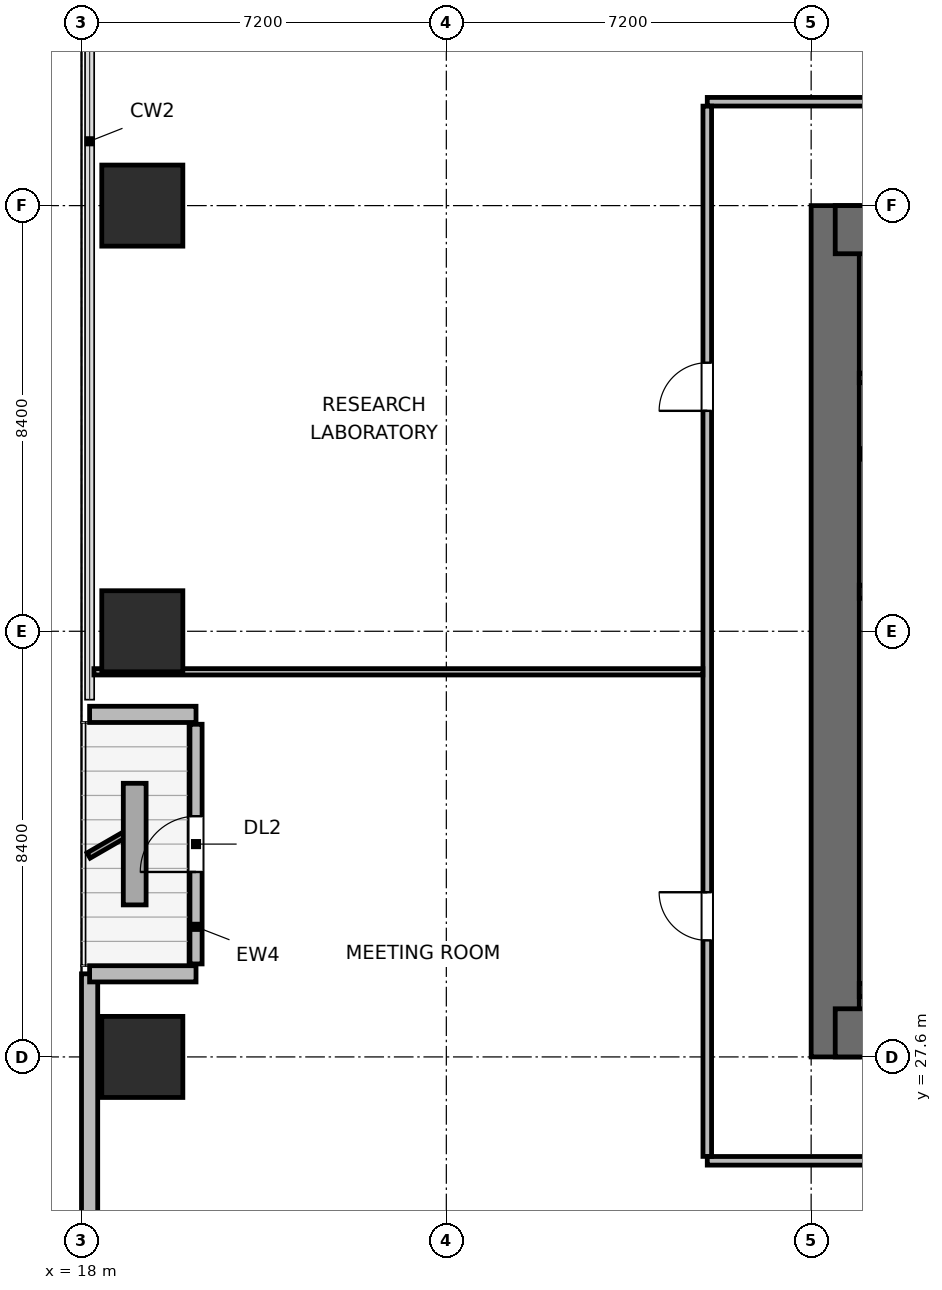
"""IFC4 building model, lengths in metres.
Left out: names, types, materials, properties, quantities, classifications, styles, units other than length and angle.
Written with IfcOpenShell. Run it as: python <this file> out.ifc"""

import sys

from ifc_helpers import new_model, si_unit, direction, frame, frame_2d, origin, origin_2d, place, context, subcontext, project, spatial, rectangle, extrude, element, fill, save


model = new_model("IFC4")
c1 = context("Model", 3, precision=1e-05, world=origin(), true_north=direction((0.0, 1.0)))
c2 = subcontext(c1, "Body", "Model", "MODEL_VIEW")
j1 = project(units=[si_unit("LENGTHUNIT", "METRE"), si_unit("PLANEANGLEUNIT", "RADIAN")], contexts=[c1])
p1 = place(None, origin())
s1 = spatial("IfcSite", under=j1, at=p1, CompositionType="ELEMENT")
p2 = place(p1, origin())
s2 = spatial("IfcBuilding", under=s1, at=p2, CompositionType="ELEMENT")
p3 = place(p2, frame((0.0, 0.0, 25.5)))
s3 = spatial("IfcBuildingStorey", under=s2, at=p3, CompositionType="ELEMENT", Elevation=25.5)
p4 = place(p3, frame((32.875, 27.6, 0.0), z_axis=(0.0, 0.0, 1.0), x_axis=(0.0, 1.0, 0.0)))
e1 = element("IfcWall", 1, at=p4, inside=s3, PredefinedType="SHEAR", context=c2, shape_type="SweptSolid", body=[
    extrude(rectangle(XDim=16.8, YDim=0.95, at=frame_2d((8.4, 0.0))), origin(), (0.0, 0.0, 1.0), 3.9),
])
p5 = place(p3, frame((32.875, 28.075, 0.0), z_axis=(0.0, 0.0, 1.0), x_axis=(1.0, 0.0, 0.0)))
e2 = element("IfcWall", 2, at=p5, inside=s3, PredefinedType="SHEAR", context=c2, shape_type="SweptSolid", body=[
    extrude(rectangle(XDim=9.05, YDim=0.95, at=frame_2d((4.525, 0.0))), origin(), (0.0, 0.0, 1.0), 3.9),
])
p6 = place(p5, frame((4.975, 0.0, 0.0)))
e3 = element("IfcOpeningElement", 3, at=p6, cuts=e2, PredefinedType="OPENING", context=c2, shape_type="SweptSolid", body=[
    extrude(rectangle(XDim=1.05, YDim=2.04, at=frame_2d((0.525, 1.02))), frame((0.0, 0.485, 0.0), z_axis=(0.0, -1.0, 0.0), x_axis=(1.0, 0.0, 0.0)), (0.0, 0.0, 1.0), 0.97),
])
p7 = place(p3, frame((32.875, 43.925, 0.0), z_axis=(0.0, 0.0, 1.0), x_axis=(1.0, 0.0, 0.0)))
e4 = element("IfcWall", 4, at=p7, inside=s3, PredefinedType="SHEAR", context=c2, shape_type="SweptSolid", body=[
    extrude(rectangle(XDim=9.05, YDim=0.95, at=frame_2d((4.525, 0.0))), origin(), (0.0, 0.0, 1.0), 3.9),
])
p8 = place(p7, frame((0.975, 0.0, 0.0)))
e5 = element("IfcOpeningElement", 5, at=p8, cuts=e4, PredefinedType="OPENING", context=c2, shape_type="SweptSolid", body=[
    extrude(rectangle(XDim=0.95, YDim=2.04, at=frame_2d((0.475, 1.02))), frame((0.0, 0.485, 0.0), z_axis=(0.0, -1.0, 0.0), x_axis=(1.0, 0.0, 0.0)), (0.0, 0.0, 1.0), 0.97),
])
p9 = place(p7, frame((4.225, 0.0, 0.0)))
e6 = element("IfcOpeningElement", 6, at=p9, cuts=e4, PredefinedType="OPENING", context=c2, shape_type="SweptSolid", body=[
    extrude(rectangle(XDim=0.9, YDim=2.02, at=frame_2d((0.45, 1.01))), frame((0.0, 0.485, 0.0), z_axis=(0.0, -1.0, 0.0), x_axis=(1.0, 0.0, 0.0)), (0.0, 0.0, 1.0), 0.97),
])
p10 = place(p7, frame((7.125, 0.0, 0.0)))
e7 = element("IfcOpeningElement", 7, at=p10, cuts=e4, PredefinedType="OPENING", context=c2, shape_type="SweptSolid", body=[
    extrude(rectangle(XDim=0.9, YDim=2.02, at=frame_2d((0.45, 1.01))), frame((0.0, 0.485, 0.0), z_axis=(0.0, -1.0, 0.0), x_axis=(1.0, 0.0, 0.0)), (0.0, 0.0, 1.0), 0.97),
])
for number, where, z_axis, x_axis in (
    (8, (33.35, 28.92, 0.0), (0.0, 0.0, 1.0), (1.0, 0.0, 0.0)),
    (9, (33.35, 36.78, 0.0), (0.0, 0.0, 1.0), (1.0, 0.0, 0.0)),
):
    element("IfcWall", number, at=place(p3, frame(where, z_axis=z_axis, x_axis=x_axis)), inside=s3, PredefinedType="SHEAR", context=c2, shape_type="SweptSolid", body=[
        extrude(rectangle(XDim=3.76, YDim=0.26, at=frame_2d((1.88, 0.0))), origin(), (0.0, 0.0, 1.0), 3.9),
    ])
for number, where, z_axis, x_axis in (
    (10, (19.2, 27.6, 0.0), (0.0, 0.0, 1.0), (1.0, 0.0, 0.0)),
    (11, (19.2, 36.0, 0.0), (0.0, 0.0, 1.0), (1.0, 0.0, 0.0)),
    (12, (19.2, 44.4, 0.0), (0.0, 0.0, 1.0), (1.0, 0.0, 0.0)),
):
    element("IfcColumn", number, at=place(p3, frame(where, z_axis=z_axis, x_axis=x_axis)), inside=s3, PredefinedType="COLUMN", context=c2, shape_type="SweptSolid", body=[
        extrude(rectangle(XDim=1.6, YDim=1.6, at=origin_2d()), origin(), (0.0, 0.0, 1.0), 3.9),
    ])
p11 = place(p3, frame((18.16, 15.021, 0.0), z_axis=(0.0, 0.0, 1.0), x_axis=(0.0, 1.0, 0.0)))
e13 = element("IfcWall", 13, at=p11, inside=s3, PredefinedType="SOLIDWALL", context=c2, shape_type="SweptSolid", body=[
    extrude(rectangle(XDim=14.219, YDim=0.32, at=frame_2d((7.109, 0.0))), origin(), (0.0, 0.0, 1.0), 3.64),
])
p12 = place(p3, frame((18.16, 29.24, 0.0), z_axis=(0.0, 0.0, 1.0), x_axis=(1.0, 0.0, 0.0)))
e14 = element("IfcWall", 14, at=p12, inside=s3, PredefinedType="SOLIDWALL", context=c2, shape_type="SweptSolid", body=[
    extrude(rectangle(XDim=2.1, YDim=0.32, at=frame_2d((1.05, 0.0))), origin(), (0.0, 0.0, 1.0), 2.875),
])
p13 = place(p3, frame((20.26, 29.435, 0.0), z_axis=(0.0, 0.0, 1.0), x_axis=(0.0, 1.0, 0.0)))
e15 = element("IfcWall", 15, at=p13, inside=s3, PredefinedType="SOLIDWALL", context=c2, shape_type="SweptSolid", body=[
    extrude(rectangle(XDim=4.73, YDim=0.24, at=frame_2d((2.365, 0.0))), origin(), (0.0, 0.0, 1.0), 3.162),
])
p14 = place(p13, frame((1.815, 0.0, 0.0)))
e16 = element("IfcOpeningElement", 16, at=p14, cuts=e15, PredefinedType="OPENING", context=c2, shape_type="SweptSolid", body=[
    extrude(rectangle(XDim=1.1, YDim=2.04, at=frame_2d((0.55, 1.02))), frame((0.0, 0.13, 0.0), z_axis=(0.0, -1.0, 0.0), x_axis=(1.0, 0.0, 0.0)), (0.0, 0.0, 1.0), 0.26),
])
p15 = place(p3, frame((20.26, 34.36, 0.0), z_axis=(0.0, 0.0, 1.0), x_axis=(-1.0, 0.0, 0.0)))
e17 = element("IfcWall", 17, at=p15, inside=s3, PredefinedType="SOLIDWALL", context=c2, shape_type="SweptSolid", body=[
    extrude(rectangle(XDim=2.1, YDim=0.32, at=frame_2d((1.05, 0.0))), origin(), (0.0, 0.0, 1.0), 2.875),
])
p16 = place(p3, frame((33.35, 41.0, 0.0), z_axis=(0.0, 0.0, 1.0), x_axis=(1.0, 0.0, 0.0)))
e18 = element("IfcWall", 18, at=p16, inside=s3, PredefinedType="PLUMBINGWALL", context=c2, shape_type="SweptSolid", body=[
    extrude(rectangle(XDim=8.1, YDim=0.19, at=frame_2d((4.05, 0.0))), origin(), (0.0, 0.0, 1.0), 3.64),
])
p17 = place(p3, frame((33.36, 39.5, 0.0), z_axis=(0.0, 0.0, 1.0), x_axis=(1.0, 0.0, 0.0)))
e19 = element("IfcWall", 19, at=p17, inside=s3, PredefinedType="PARTITIONING", context=c2, shape_type="SweptSolid", body=[
    extrude(rectangle(XDim=1.86, YDim=0.21, at=frame_2d((0.93, 0.0))), origin(), (0.0, 0.0, 1.0), 3.64),
])
p18 = place(p3, frame((30.35, 25.55, 0.0), z_axis=(0.0, 0.0, 1.0), x_axis=(1.0, 0.0, 0.0)))
e20 = element("IfcWall", 20, at=p18, inside=s3, PredefinedType="PARTITIONING", context=c2, shape_type="SweptSolid", body=[
    extrude(rectangle(XDim=35.3, YDim=0.17, at=frame_2d((17.65, 0.0))), origin(), (0.0, 0.0, 1.0), 3.64),
])
p19 = place(p18, frame((8.35, 0.0, 0.0)))
e21 = element("IfcOpeningElement", 21, at=p19, cuts=e20, PredefinedType="OPENING", context=c2, shape_type="SweptSolid", body=[
    extrude(rectangle(XDim=0.95, YDim=2.04, at=frame_2d((0.475, 1.02))), frame((0.0, 0.095, 0.0), z_axis=(0.0, -1.0, 0.0), x_axis=(1.0, 0.0, 0.0)), (0.0, 0.0, 1.0), 0.19),
])
p20 = place(p18, frame((26.0, 0.0, 0.0)))
e22 = element("IfcOpeningElement", 22, at=p20, cuts=e20, PredefinedType="OPENING", context=c2, shape_type="SweptSolid", body=[
    extrude(rectangle(XDim=0.95, YDim=2.04, at=frame_2d((0.475, 1.02))), frame((0.0, 0.095, 0.0), z_axis=(0.0, -1.0, 0.0), x_axis=(1.0, 0.0, 0.0)), (0.0, 0.0, 1.0), 0.19),
])
p21 = place(p3, frame((30.35, 46.45, 0.0), z_axis=(0.0, 0.0, 1.0), x_axis=(1.0, 0.0, 0.0)))
e23 = element("IfcWall", 23, at=p21, inside=s3, PredefinedType="PARTITIONING", context=c2, shape_type="SweptSolid", body=[
    extrude(rectangle(XDim=35.3, YDim=0.17, at=frame_2d((17.65, 0.0))), origin(), (0.0, 0.0, 1.0), 3.64),
])
p22 = place(p21, frame((6.21, 0.0, 0.0)))
e24 = element("IfcOpeningElement", 24, at=p22, cuts=e23, PredefinedType="OPENING", context=c2, shape_type="SweptSolid", body=[
    extrude(rectangle(XDim=0.95, YDim=2.04, at=frame_2d((0.475, 1.02))), frame((0.0, 0.095, 0.0), z_axis=(0.0, -1.0, 0.0), x_axis=(1.0, 0.0, 0.0)), (0.0, 0.0, 1.0), 0.19),
])
p23 = place(p21, frame((15.38, 0.0, 0.0)))
e25 = element("IfcOpeningElement", 25, at=p23, cuts=e23, PredefinedType="OPENING", context=c2, shape_type="SweptSolid", body=[
    extrude(rectangle(XDim=0.95, YDim=2.04, at=frame_2d((0.475, 1.02))), frame((0.0, 0.095, 0.0), z_axis=(0.0, -1.0, 0.0), x_axis=(1.0, 0.0, 0.0)), (0.0, 0.0, 1.0), 0.19),
])
p24 = place(p21, frame((26.345, 0.0, 0.0)))
e26 = element("IfcOpeningElement", 26, at=p24, cuts=e23, PredefinedType="OPENING", context=c2, shape_type="SweptSolid", body=[
    extrude(rectangle(XDim=0.95, YDim=2.04, at=frame_2d((0.475, 1.02))), frame((0.0, 0.095, 0.0), z_axis=(0.0, -1.0, 0.0), x_axis=(1.0, 0.0, 0.0)), (0.0, 0.0, 1.0), 0.19),
])
p25 = place(p3, frame((30.35, 25.637, 0.0), z_axis=(0.0, 0.0, 1.0), x_axis=(0.0, 1.0, 0.0)))
e27 = element("IfcWall", 27, at=p25, inside=s3, PredefinedType="PARTITIONING", context=c2, shape_type="SweptSolid", body=[
    extrude(rectangle(XDim=20.726, YDim=0.17, at=frame_2d((10.363, 0.0))), origin(), (0.0, 0.0, 1.0), 3.64),
])
p26 = place(p25, frame((4.263, 0.0, 0.0)))
e28 = element("IfcOpeningElement", 28, at=p26, cuts=e27, PredefinedType="OPENING", context=c2, shape_type="SweptSolid", body=[
    extrude(rectangle(XDim=0.95, YDim=2.04, at=frame_2d((0.475, 1.02))), frame((0.0, 0.095, 0.0), z_axis=(0.0, -1.0, 0.0), x_axis=(1.0, 0.0, 0.0)), (0.0, 0.0, 1.0), 0.19),
])
p27 = place(p25, frame((14.713, 0.0, 0.0)))
e29 = element("IfcOpeningElement", 29, at=p27, cuts=e27, PredefinedType="OPENING", context=c2, shape_type="SweptSolid", body=[
    extrude(rectangle(XDim=0.95, YDim=2.04, at=frame_2d((0.475, 1.02))), frame((0.0, 0.095, 0.0), z_axis=(0.0, -1.0, 0.0), x_axis=(1.0, 0.0, 0.0)), (0.0, 0.0, 1.0), 0.19),
])
p28 = place(p3, frame((18.245, 35.2, 0.0), z_axis=(0.0, 0.0, 1.0), x_axis=(1.0, 0.0, 0.0)))
e30 = element("IfcWall", 30, at=p28, inside=s3, PredefinedType="PARTITIONING", context=c2, shape_type="SweptSolid", body=[
    extrude(rectangle(XDim=12.018, YDim=0.125, at=frame_2d((6.009, 0.0))), origin(), (0.0, 0.0, 1.0), 3.64),
])
p29 = place(p14, origin())
e31 = element("IfcDoor", 31, at=p29, inside=s3, OperationType="SINGLE_SWING_LEFT", PredefinedType="DOOR", context=c2, shape_type="SweptSolid", body=[
    extrude(rectangle(XDim=1.1, YDim=2.04, at=frame_2d((0.55, 1.02))), frame((0.0, 0.025, 0.0), z_axis=(0.0, -1.0, 0.0), x_axis=(1.0, 0.0, 0.0)), (0.0, 0.0, 1.0), 0.05),
])
fill(e16, e31)
p30 = place(p26, origin())
e32 = element("IfcDoor", 32, at=p30, inside=s3, OperationType="SINGLE_SWING_RIGHT", PredefinedType="DOOR", context=c2, shape_type="SweptSolid", body=[
    extrude(rectangle(XDim=0.95, YDim=2.04, at=frame_2d((0.475, 1.02))), frame((0.0, 0.025, 0.0), z_axis=(0.0, -1.0, 0.0), x_axis=(1.0, 0.0, 0.0)), (0.0, 0.0, 1.0), 0.05),
])
fill(e28, e32)
p31 = place(p27, origin())
e33 = element("IfcDoor", 33, at=p31, inside=s3, OperationType="SINGLE_SWING_LEFT", PredefinedType="DOOR", context=c2, shape_type="SweptSolid", body=[
    extrude(rectangle(XDim=0.95, YDim=2.04, at=frame_2d((0.475, 1.02))), frame((0.0, 0.025, 0.0), z_axis=(0.0, -1.0, 0.0), x_axis=(1.0, 0.0, 0.0)), (0.0, 0.0, 1.0), 0.05),
])
fill(e29, e33)
save(model, sys.argv[1])
